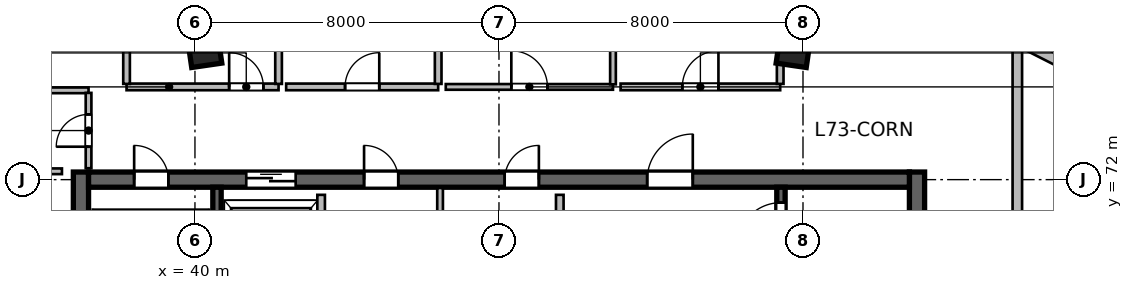
"""IFC4 building model, lengths in metres.
Left out: names, types, materials, properties, quantities, classifications, styles, units other than length and angle.
Written with IfcOpenShell. Run it as: python <this file> out.ifc"""

import sys

from ifc_helpers import new_model, si_unit, direction, frame, frame_2d, origin, origin_2d, place, context, subcontext, project, spatial, rectangle, extrude, source, transform, mapped, element, fill, save


model = new_model("IFC4")
c1 = context("Model", 3, precision=1e-05, world=origin(), true_north=direction((0.0, 1.0)))
c2 = subcontext(c1, "Body", "Model", "MODEL_VIEW")
j1 = project(units=[si_unit("LENGTHUNIT", "METRE"), si_unit("PLANEANGLEUNIT", "RADIAN")], contexts=[c1])
p1 = place(None, origin())
s1 = spatial("IfcSite", under=j1, at=p1, CompositionType="ELEMENT")
p2 = place(p1, origin())
s2 = spatial("IfcBuilding", under=s1, at=p2, CompositionType="ELEMENT")
p3 = place(p2, frame((0.0, 0.0, 299.1)))
s3 = spatial("IfcBuildingStorey", under=s2, at=p3, CompositionType="ELEMENT", Elevation=299.1)
m1 = source(origin(), c2, "Body", "SweptSolid", [
    extrude(rectangle(XDim=12.0, YDim=0.4, at=frame_2d((6.0, 0.0))), origin(), (0.0, 0.0, 1.0), 3.9),
])
for number, where, z_axis, x_axis in (
    (1, (37.0, 60.2, 0.0), (0.0, 0.0, 1.0), (0.0, 1.0, 0.0)),
    (2, (59.0, 60.2, 0.0), (0.0, 0.0, 1.0), (0.0, 1.0, 0.0)),
):
    element("IfcWall", number, at=place(p3, frame(where, z_axis=z_axis, x_axis=x_axis)), inside=s3, PredefinedType="SHEAR", context=c2, shape_type="MappedRepresentation", body=[
        mapped(m1, transform((0.0, 0.0, 0.0), scale=1.0)),
    ])
m2 = source(origin(), c2, "Body", "SweptSolid", [
    extrude(rectangle(XDim=21.6, YDim=0.4, at=frame_2d((10.8, 0.0))), origin(), (0.0, 0.0, 1.0), 3.9),
])
p4 = place(p3, frame((37.2, 72.0, 0.0), z_axis=(0.0, 0.0, 1.0), x_axis=(1.0, 0.0, 0.0)))
e3 = element("IfcWall", 3, at=p4, inside=s3, PredefinedType="SHEAR", context=c2, shape_type="MappedRepresentation", body=[
    mapped(m2, transform((0.0, 0.0, 0.0), scale=1.0)),
])
p5 = place(p4, frame((1.2, 0.0, 0.0)))
e4 = element("IfcOpeningElement", 4, at=p5, cuts=e3, PredefinedType="OPENING", context=c2, shape_type="SweptSolid", body=[
    extrude(rectangle(XDim=0.9, YDim=2.1, at=frame_2d((0.45, 1.05))), frame((0.0, 0.21, 0.0), z_axis=(0.0, -1.0, 0.0), x_axis=(1.0, 0.0, 0.0)), (0.0, 0.0, 1.0), 0.42),
])
p6 = place(p4, frame((14.7, 0.0, 0.0)))
e5 = element("IfcOpeningElement", 5, at=p6, cuts=e3, PredefinedType="OPENING", context=c2, shape_type="SweptSolid", body=[
    extrude(rectangle(XDim=1.2, YDim=2.15, at=frame_2d((0.6, 1.075))), frame((0.0, 0.21, 0.0), z_axis=(0.0, -1.0, 0.0), x_axis=(1.0, 0.0, 0.0)), (0.0, 0.0, 1.0), 0.42),
])
p7 = place(p4, frame((4.15, 0.0, 0.0)))
e6 = element("IfcOpeningElement", 6, at=p7, cuts=e3, PredefinedType="OPENING", context=c2, shape_type="SweptSolid", body=[
    extrude(rectangle(XDim=1.3, YDim=2.15, at=frame_2d((0.65, 1.075))), frame((0.0, 0.21, 0.0), z_axis=(0.0, -1.0, 0.0), x_axis=(1.0, 0.0, 0.0)), (0.0, 0.0, 1.0), 0.42),
])
p8 = place(p4, frame((7.25, 0.0, 0.0)))
e7 = element("IfcOpeningElement", 7, at=p8, cuts=e3, PredefinedType="OPENING", context=c2, shape_type="SweptSolid", body=[
    extrude(rectangle(XDim=0.9, YDim=2.1, at=frame_2d((0.45, 1.05))), frame((0.0, 0.21, 0.0), z_axis=(0.0, -1.0, 0.0), x_axis=(1.0, 0.0, 0.0)), (0.0, 0.0, 1.0), 0.42),
])
p9 = place(p4, frame((10.95, 0.0, 0.0)))
e8 = element("IfcOpeningElement", 8, at=p9, cuts=e3, PredefinedType="OPENING", context=c2, shape_type="SweptSolid", body=[
    extrude(rectangle(XDim=0.9, YDim=2.1, at=frame_2d((0.45, 1.05))), frame((0.0, 0.21, 0.0), z_axis=(0.0, -1.0, 0.0), x_axis=(1.0, 0.0, 0.0)), (0.0, 0.0, 1.0), 0.42),
])
m3 = source(origin(), c2, "Body", "SweptSolid", [
    extrude(rectangle(XDim=11.2, YDim=0.22, at=frame_2d((5.6, 0.0))), origin(), (0.0, 0.0, 1.0), 3.9),
])
p10 = place(p3, frame((40.58, 60.6, 0.0), z_axis=(0.0, 0.0, 1.0), x_axis=(0.0, 1.0, 0.0)))
e9 = element("IfcWall", 9, at=p10, inside=s3, PredefinedType="SHEAR", context=c2, shape_type="MappedRepresentation", body=[
    mapped(m3, transform((0.0, 0.0, 0.0), scale=1.0)),
])
p11 = place(p3, frame((55.42, 60.6, 0.0), z_axis=(0.0, 0.0, 1.0), x_axis=(0.0, 1.0, 0.0)))
e10 = element("IfcWall", 10, at=p11, inside=s3, PredefinedType="SHEAR", context=c2, shape_type="MappedRepresentation", body=[
    mapped(m3, transform((0.0, 0.0, 0.0), scale=1.0)),
])
p12 = place(p11, frame((9.645, 0.0, 0.0)))
e11 = element("IfcOpeningElement", 11, at=p12, cuts=e10, PredefinedType="OPENING", context=c2, shape_type="SweptSolid", body=[
    extrude(rectangle(XDim=1.15, YDim=2.15, at=frame_2d((0.575, 1.075))), frame((0.0, 0.12, 0.0), z_axis=(0.0, -1.0, 0.0), x_axis=(1.0, 0.0, 0.0)), (0.0, 0.0, 1.0), 0.24),
])
m4 = source(origin(), c2, "Body", "SweptSolid", [
    extrude(rectangle(XDim=0.8, YDim=0.8, at=origin_2d()), origin(), (0.0, 0.0, 1.0), 3.9),
])
for number, where, z_axis, x_axis in (
    (12, (40.253, 75.404, 0.0), (0.0, 0.0, 1.0), (-0.143, 0.99, 0.0)),
    (13, (55.747, 75.404, 0.0), (0.0, 0.0, 1.0), (0.143, 0.99, 0.0)),
):
    element("IfcColumn", number, at=place(p3, frame(where, z_axis=z_axis, x_axis=x_axis)), inside=s3, PredefinedType="COLUMN", context=c2, shape_type="MappedRepresentation", body=[
        mapped(m4, transform((0.0, 0.0, 0.0), scale=1.0)),
    ])
m5 = source(origin(), c2, "Body", "SweptSolid", [
    extrude(rectangle(XDim=2.673, YDim=0.28, at=frame_2d((1.337, 0.0))), origin(), (0.0, 0.0, 1.0), 3.64),
])
p13 = place(p3, frame((33.907, 75.458, 0.0), z_axis=(0.0, 0.0, 1.0), x_axis=(0.919036345912, 0.394172798266, 0.0)))
e14 = element("IfcWall", 14, at=p13, inside=s3, PredefinedType="SOLIDWALL", context=c2, shape_type="MappedRepresentation", body=[
    mapped(m5, transform((0.0, 0.0, 0.0), scale=1.0)),
])
m6 = source(origin(), c2, "Body", "SweptSolid", [
    extrude(rectangle(XDim=2.706, YDim=0.28, at=frame_2d((1.353, 0.0))), origin(), (0.0, 0.0, 1.0), 3.64),
])
p14 = place(p3, frame((61.745, 75.62, 0.0), z_axis=(0.0, 0.0, 1.0), x_axis=(0.891648836287, -0.452727680564, 0.0)))
e15 = element("IfcWall", 15, at=p14, inside=s3, PredefinedType="SOLIDWALL", context=c2, shape_type="MappedRepresentation", body=[
    mapped(m6, transform((0.0, 0.0, 0.0), scale=1.0)),
])
m7 = source(origin(), c2, "Body", "SweptSolid", [
    extrude(rectangle(XDim=5.8, YDim=0.2, at=frame_2d((2.9, 0.0))), origin(), (0.0, 0.0, 1.0), 3.64),
])
p15 = place(p3, frame((49.6, 65.8, 0.0), z_axis=(0.0, 0.0, 1.0), x_axis=(0.0, 1.0, 0.0)))
e16 = element("IfcWall", 16, at=p15, inside=s3, PredefinedType="SOLIDWALL", context=c2, shape_type="MappedRepresentation", body=[
    mapped(m7, transform((0.0, 0.0, 0.0), scale=1.0)),
])
m8 = source(origin(), c2, "Body", "SweptSolid", [
    extrude(rectangle(XDim=3.2, YDim=0.2, at=frame_2d((1.6, 0.0))), origin(), (0.0, 0.0, 1.0), 3.64),
])
p16 = place(p3, frame((43.32, 68.4, 0.0), z_axis=(0.0, 0.0, 1.0), x_axis=(0.0, 1.0, 0.0)))
e17 = element("IfcWall", 17, at=p16, inside=s3, PredefinedType="SOLIDWALL", context=c2, shape_type="MappedRepresentation", body=[
    mapped(m8, transform((0.0, 0.0, 0.0), scale=1.0)),
])
m9 = source(origin(), c2, "Body", "SweptSolid", [
    extrude(rectangle(XDim=3.38, YDim=0.15, at=frame_2d((1.69, 0.0))), origin(), (0.0, 0.0, 1.0), 3.64),
])
p17 = place(p3, frame((46.45, 68.4, 0.0), z_axis=(0.0, 0.0, 1.0), x_axis=(0.0, 1.0, 0.0)))
e18 = element("IfcWall", 18, at=p17, inside=s3, PredefinedType="PARTITIONING", context=c2, shape_type="MappedRepresentation", body=[
    mapped(m9, transform((0.0, 0.0, 0.0), scale=1.0)),
])
m10 = source(origin(), c2, "Body", "SweptSolid", [
    extrude(rectangle(XDim=2.1, YDim=0.15, at=frame_2d((1.05, 0.0))), origin(), (0.0, 0.0, 1.0), 3.64),
])
p18 = place(p3, frame((34.4, 72.22, 0.0), z_axis=(0.0, 0.0, 1.0), x_axis=(1.0, 0.0, 0.0)))
e19 = element("IfcWall", 19, at=p18, inside=s3, PredefinedType="PARTITIONING", context=c2, shape_type="MappedRepresentation", body=[
    mapped(m10, transform((0.0, 0.0, 0.0), scale=1.0)),
])
m11 = source(origin(), c2, "Body", "SweptSolid", [
    extrude(rectangle(XDim=2.8, YDim=0.15, at=frame_2d((1.4, 0.0))), origin(), (0.0, 0.0, 1.0), 3.64),
])
p19 = place(p3, frame((34.4, 74.35, 0.0), z_axis=(0.0, 0.0, 1.0), x_axis=(1.0, 0.0, 0.0)))
e20 = element("IfcWall", 20, at=p19, inside=s3, PredefinedType="PARTITIONING", context=c2, shape_type="MappedRepresentation", body=[
    mapped(m11, transform((0.0, 0.0, 0.0), scale=1.0)),
])
m12 = source(origin(), c2, "Body", "SweptSolid", [
    extrude(rectangle(XDim=1.982, YDim=0.15, at=frame_2d((0.991, 0.0))), origin(), (0.0, 0.0, 1.0), 3.64),
])
p20 = place(p3, frame((37.2, 72.3, 0.0), z_axis=(0.0, 0.0, 1.0), x_axis=(0.0, 1.0, 0.0)))
e21 = element("IfcWall", 21, at=p20, inside=s3, PredefinedType="PARTITIONING", context=c2, shape_type="MappedRepresentation", body=[
    mapped(m12, transform((0.0, 0.0, 0.0), scale=1.0)),
])
p21 = place(p20, frame((0.566, 0.0, 0.0)))
e22 = element("IfcOpeningElement", 22, at=p21, cuts=e21, PredefinedType="OPENING", context=c2, shape_type="SweptSolid", body=[
    extrude(rectangle(XDim=0.85, YDim=2.1, at=frame_2d((0.425, 1.05))), frame((0.0, 0.085, 0.0), z_axis=(0.0, -1.0, 0.0), x_axis=(1.0, 0.0, 0.0)), (0.0, 0.0, 1.0), 0.17),
])
m13 = source(origin(), c2, "Body", "SweptSolid", [
    extrude(rectangle(XDim=4.0, YDim=0.175, at=frame_2d((2.0, 0.0))), origin(), (0.0, 0.0, 1.0), 3.64),
])
p22 = place(p3, frame((38.2, 74.44, 0.0), z_axis=(0.0, 0.0, 1.0), x_axis=(1.0, 0.0, 0.0)))
e23 = element("IfcWall", 23, at=p22, inside=s3, PredefinedType="PARTITIONING", context=c2, shape_type="MappedRepresentation", body=[
    mapped(m13, transform((0.0, 0.0, 0.0), scale=1.0)),
])
p23 = place(p22, frame((2.7, 0.0, 0.0)))
e24 = element("IfcOpeningElement", 24, at=p23, cuts=e23, PredefinedType="OPENING", context=c2, shape_type="SweptSolid", body=[
    extrude(rectangle(XDim=0.9, YDim=2.08, at=frame_2d((0.45, 1.04))), frame((0.0, 0.098, 0.0), z_axis=(0.0, -1.0, 0.0), x_axis=(1.0, 0.0, 0.0)), (0.0, 0.0, 1.0), 0.195),
])
m14 = source(origin(), c2, "Body", "SweptSolid", [
    extrude(rectangle(XDim=2.403, YDim=0.175, at=frame_2d((1.201, 0.0))), origin(), (0.0, 0.0, 1.0), 3.64),
])
for number, where, z_axis, x_axis in (
    (25, (38.2, 74.519, 0.0), (0.0, 0.0, 1.0), (0.0, 1.0, 0.0)),
    (26, (42.2, 74.519, 0.0), (0.0, 0.0, 1.0), (0.0, 1.0, 0.0)),
):
    element("IfcWall", number, at=place(p3, frame(where, z_axis=z_axis, x_axis=x_axis)), inside=s3, PredefinedType="PARTITIONING", context=c2, shape_type="MappedRepresentation", body=[
        mapped(m14, transform((0.0, 0.0, 0.0), scale=1.0)),
    ])
p24 = place(p3, frame((42.4, 74.44, 0.0), z_axis=(0.0, 0.0, 1.0), x_axis=(1.0, 0.0, 0.0)))
e27 = element("IfcWall", 27, at=p24, inside=s3, PredefinedType="PARTITIONING", context=c2, shape_type="MappedRepresentation", body=[
    mapped(m13, transform((0.0, 0.0, 0.0), scale=1.0)),
])
p25 = place(p24, frame((1.55, 0.0, 0.0)))
e28 = element("IfcOpeningElement", 28, at=p25, cuts=e27, PredefinedType="OPENING", context=c2, shape_type="SweptSolid", body=[
    extrude(rectangle(XDim=0.9, YDim=2.08, at=frame_2d((0.45, 1.04))), frame((0.0, 0.098, 0.0), z_axis=(0.0, -1.0, 0.0), x_axis=(1.0, 0.0, 0.0)), (0.0, 0.0, 1.0), 0.195),
])
p26 = place(p3, frame((46.4, 74.519, 0.0), z_axis=(0.0, 0.0, 1.0), x_axis=(0.0, 1.0, 0.0)))
e29 = element("IfcWall", 29, at=p26, inside=s3, PredefinedType="PARTITIONING", context=c2, shape_type="MappedRepresentation", body=[
    mapped(m14, transform((0.0, 0.0, 0.0), scale=1.0)),
])
m15 = source(origin(), c2, "Body", "SweptSolid", [
    extrude(rectangle(XDim=4.4, YDim=0.15, at=frame_2d((2.2, 0.0))), origin(), (0.0, 0.0, 1.0), 3.64),
])
p27 = place(p3, frame((46.6, 74.44, 0.0), z_axis=(0.0, 0.0, 1.0), x_axis=(1.0, 0.0, 0.0)))
e30 = element("IfcWall", 30, at=p27, inside=s3, PredefinedType="PARTITIONING", context=c2, shape_type="MappedRepresentation", body=[
    mapped(m15, transform((0.0, 0.0, 0.0), scale=1.0)),
])
p28 = place(p27, frame((1.725, 0.0, 0.0)))
e31 = element("IfcOpeningElement", 31, at=p28, cuts=e30, PredefinedType="OPENING", context=c2, shape_type="SweptSolid", body=[
    extrude(rectangle(XDim=0.95, YDim=2.1, at=frame_2d((0.475, 1.05))), frame((0.0, 0.085, 0.0), z_axis=(0.0, -1.0, 0.0), x_axis=(1.0, 0.0, 0.0)), (0.0, 0.0, 1.0), 0.17),
])
m16 = source(origin(), c2, "Body", "SweptSolid", [
    extrude(rectangle(XDim=2.425, YDim=0.15, at=frame_2d((1.212, 0.0))), origin(), (0.0, 0.0, 1.0), 3.64),
])
p29 = place(p3, frame((51.0, 74.508, 0.0), z_axis=(0.0, 0.0, 1.0), x_axis=(0.0, 1.0, 0.0)))
e32 = element("IfcWall", 32, at=p29, inside=s3, PredefinedType="PARTITIONING", context=c2, shape_type="MappedRepresentation", body=[
    mapped(m16, transform((0.0, 0.0, 0.0), scale=1.0)),
])
m17 = source(origin(), c2, "Body", "SweptSolid", [
    extrude(rectangle(XDim=4.2, YDim=0.175, at=frame_2d((2.1, 0.0))), origin(), (0.0, 0.0, 1.0), 3.64),
])
p30 = place(p3, frame((51.2, 74.44, 0.0), z_axis=(0.0, 0.0, 1.0), x_axis=(1.0, 0.0, 0.0)))
e33 = element("IfcWall", 33, at=p30, inside=s3, PredefinedType="PARTITIONING", context=c2, shape_type="MappedRepresentation", body=[
    mapped(m17, transform((0.0, 0.0, 0.0), scale=1.0)),
])
p31 = place(p30, frame((1.625, 0.0, 0.0)))
e34 = element("IfcOpeningElement", 34, at=p31, cuts=e33, PredefinedType="OPENING", context=c2, shape_type="SweptSolid", body=[
    extrude(rectangle(XDim=0.95, YDim=2.12, at=frame_2d((0.475, 1.06))), frame((0.0, 0.098, 0.0), z_axis=(0.0, -1.0, 0.0), x_axis=(1.0, 0.0, 0.0)), (0.0, 0.0, 1.0), 0.195),
])
p32 = place(p3, frame((55.4, 74.519, 0.0), z_axis=(0.0, 0.0, 1.0), x_axis=(0.0, 1.0, 0.0)))
e35 = element("IfcWall", 35, at=p32, inside=s3, PredefinedType="PARTITIONING", context=c2, shape_type="MappedRepresentation", body=[
    mapped(m14, transform((0.0, 0.0, 0.0), scale=1.0)),
])
m18 = source(origin(), c2, "Body", "SweptSolid", [
    extrude(rectangle(XDim=10.153, YDim=0.25, at=frame_2d((5.077, 0.0))), origin(), (0.0, 0.0, 1.0), 3.64),
])
p33 = place(p3, frame((61.64, 65.5, 0.0), z_axis=(0.0, 0.0, 1.0), x_axis=(0.0, 1.0, 0.0)))
e36 = element("IfcWall", 36, at=p33, inside=s3, PredefinedType="PARTITIONING", context=c2, shape_type="MappedRepresentation", body=[
    mapped(m18, transform((0.0, 0.0, 0.0), scale=1.0)),
])
p34 = place(p33, frame((4.602, 0.0, 0.0)))
e37 = element("IfcOpeningElement", 37, at=p34, cuts=e36, PredefinedType="OPENING", context=c2, shape_type="SweptSolid", body=[
    extrude(rectangle(XDim=0.95, YDim=2.1, at=frame_2d((0.475, 1.05))), frame((0.0, 0.135, 0.0), z_axis=(0.0, -1.0, 0.0), x_axis=(1.0, 0.0, 0.0)), (0.0, 0.0, 1.0), 0.27),
])
m19 = source(origin(), c2, "Body", "SweptSolid", [
    extrude(rectangle(XDim=0.9, YDim=2.1, at=frame_2d((0.45, 1.05))), frame((0.0, 0.025, 0.0), z_axis=(0.0, -1.0, 0.0), x_axis=(1.0, 0.0, 0.0)), (0.0, 0.0, 1.0), 0.05),
])
p35 = place(p5, origin())
e38 = element("IfcDoor", 38, at=p35, inside=s3, OperationType="SINGLE_SWING_LEFT", PredefinedType="DOOR", context=c2, shape_type="MappedRepresentation", body=[
    mapped(m19, transform((0.0, 0.0, 0.0), scale=1.0)),
])
fill(e4, e38)
m20 = source(origin(), c2, "Body", "SweptSolid", [
    extrude(rectangle(XDim=1.15, YDim=2.15, at=frame_2d((0.575, 1.075))), frame((0.0, 0.025, 0.0), z_axis=(0.0, -1.0, 0.0), x_axis=(1.0, 0.0, 0.0)), (0.0, 0.0, 1.0), 0.05),
])
p36 = place(p12, origin())
e39 = element("IfcDoor", 39, at=p36, inside=s3, OperationType="SINGLE_SWING_LEFT", PredefinedType="DOOR", context=c2, shape_type="MappedRepresentation", body=[
    mapped(m20, transform((0.0, 0.0, 0.0), scale=1.0)),
])
fill(e11, e39)
m21 = source(origin(), c2, "Body", "SweptSolid", [
    extrude(rectangle(XDim=1.2, YDim=2.15, at=frame_2d((0.6, 1.075))), frame((0.0, 0.025, 0.0), z_axis=(0.0, -1.0, 0.0), x_axis=(1.0, 0.0, 0.0)), (0.0, 0.0, 1.0), 0.05),
])
p37 = place(p6, origin())
e40 = element("IfcDoor", 40, at=p37, inside=s3, OperationType="SINGLE_SWING_RIGHT", PredefinedType="DOOR", context=c2, shape_type="MappedRepresentation", body=[
    mapped(m21, transform((0.0, 0.0, 0.0), scale=1.0)),
])
fill(e5, e40)
m22 = source(origin(), c2, "Body", "SweptSolid", [
    extrude(rectangle(XDim=1.3, YDim=2.15, at=frame_2d((0.65, 1.075))), frame((0.0, 0.025, 0.0), z_axis=(0.0, -1.0, 0.0), x_axis=(1.0, 0.0, 0.0)), (0.0, 0.0, 1.0), 0.05),
])
p38 = place(p7, origin())
e41 = element("IfcDoor", 41, at=p38, inside=s3, OperationType="DOUBLE_DOOR_SLIDING", PredefinedType="DOOR", context=c2, shape_type="MappedRepresentation", body=[
    mapped(m22, transform((0.0, 0.0, 0.0), scale=1.0)),
])
fill(e6, e41)
p39 = place(p8, origin())
e42 = element("IfcDoor", 42, at=p39, inside=s3, OperationType="SINGLE_SWING_LEFT", PredefinedType="DOOR", context=c2, shape_type="MappedRepresentation", body=[
    mapped(m19, transform((0.0, 0.0, 0.0), scale=1.0)),
])
fill(e7, e42)
p40 = place(p9, origin())
e43 = element("IfcDoor", 43, at=p40, inside=s3, OperationType="SINGLE_SWING_RIGHT", PredefinedType="DOOR", context=c2, shape_type="MappedRepresentation", body=[
    mapped(m19, transform((0.0, 0.0, 0.0), scale=1.0)),
])
fill(e8, e43)
m23 = source(origin(), c2, "Body", "SweptSolid", [
    extrude(rectangle(XDim=0.85, YDim=2.1, at=frame_2d((0.425, 1.05))), frame((0.0, 0.025, 0.0), z_axis=(0.0, -1.0, 0.0), x_axis=(1.0, 0.0, 0.0)), (0.0, 0.0, 1.0), 0.05),
])
p41 = place(p21, origin())
e44 = element("IfcDoor", 44, at=p41, inside=s3, OperationType="SINGLE_SWING_LEFT", PredefinedType="DOOR", context=c2, shape_type="MappedRepresentation", body=[
    mapped(m23, transform((0.0, 0.0, 0.0), scale=1.0)),
])
fill(e22, e44)
m24 = source(origin(), c2, "Body", "SweptSolid", [
    extrude(rectangle(XDim=0.9, YDim=2.08, at=frame_2d((0.45, 1.04))), frame((0.0, 0.025, 0.0), z_axis=(0.0, -1.0, 0.0), x_axis=(1.0, 0.0, 0.0)), (0.0, 0.0, 1.0), 0.05),
])
p42 = place(p23, origin())
e45 = element("IfcDoor", 45, at=p42, inside=s3, OperationType="SINGLE_SWING_LEFT", PredefinedType="DOOR", context=c2, shape_type="MappedRepresentation", body=[
    mapped(m24, transform((0.0, 0.0, 0.0), scale=1.0)),
])
fill(e24, e45)
p43 = place(p25, origin())
e46 = element("IfcDoor", 46, at=p43, inside=s3, OperationType="SINGLE_SWING_RIGHT", PredefinedType="DOOR", context=c2, shape_type="MappedRepresentation", body=[
    mapped(m24, transform((0.0, 0.0, 0.0), scale=1.0)),
])
fill(e28, e46)
m25 = source(origin(), c2, "Body", "SweptSolid", [
    extrude(rectangle(XDim=0.95, YDim=2.1, at=frame_2d((0.475, 1.05))), frame((0.0, 0.025, 0.0), z_axis=(0.0, -1.0, 0.0), x_axis=(1.0, 0.0, 0.0)), (0.0, 0.0, 1.0), 0.05),
])
p44 = place(p28, origin())
e47 = element("IfcDoor", 47, at=p44, inside=s3, OperationType="SINGLE_SWING_LEFT", PredefinedType="DOOR", context=c2, shape_type="MappedRepresentation", body=[
    mapped(m25, transform((0.0, 0.0, 0.0), scale=1.0)),
])
fill(e31, e47)
m26 = source(origin(), c2, "Body", "SweptSolid", [
    extrude(rectangle(XDim=0.95, YDim=2.12, at=frame_2d((0.475, 1.06))), frame((0.0, 0.025, 0.0), z_axis=(0.0, -1.0, 0.0), x_axis=(1.0, 0.0, 0.0)), (0.0, 0.0, 1.0), 0.05),
])
p45 = place(p31, origin())
e48 = element("IfcDoor", 48, at=p45, inside=s3, OperationType="SINGLE_SWING_RIGHT", PredefinedType="DOOR", context=c2, shape_type="MappedRepresentation", body=[
    mapped(m26, transform((0.0, 0.0, 0.0), scale=1.0)),
])
fill(e34, e48)
save(model, sys.argv[1])
